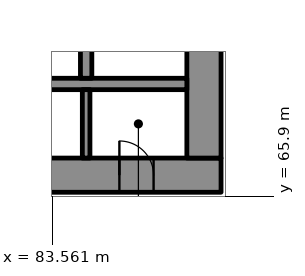
"""IFC4 building model, lengths in metres.
Left out: names, types, materials, properties, quantities, classifications, styles, units other than length and angle.
Written with IfcOpenShell. Run it as: python <this file> out.ifc"""

import sys

from ifc_helpers import new_model, si_unit, direction, frame, frame_2d, origin, place, context, subcontext, project, spatial, rectangle, extrude, element, fill, save


model = new_model("IFC4")
c1 = context("Model", 3, precision=1e-05, world=origin(), true_north=direction((0.0, 1.0)))
c2 = subcontext(c1, "Body", "Model", "MODEL_VIEW")
j1 = project(units=[si_unit("LENGTHUNIT", "METRE"), si_unit("PLANEANGLEUNIT", "RADIAN")], contexts=[c1])
p1 = place(None, origin())
s1 = spatial("IfcSite", under=j1, at=p1, CompositionType="ELEMENT")
p2 = place(p1, origin())
s2 = spatial("IfcBuilding", under=s1, at=p2, CompositionType="ELEMENT")
p3 = place(p2, frame((0.0, 0.0, 26.4)))
s3 = spatial("IfcBuildingStorey", under=s2, at=p3, CompositionType="ELEMENT", Elevation=26.4)
p4 = place(p3, frame((62.0, 66.45, 0.0), z_axis=(0.0, 0.0, 1.0), x_axis=(1.0, 0.0, 0.0)))
e1 = element("IfcWall", 1, at=p4, inside=s3, PredefinedType="SHEAR", context=c2, shape_type="SweptSolid", body=[
    extrude(rectangle(XDim=26.0, YDim=0.9, at=frame_2d((13.0, 0.0))), origin(), (0.0, 0.0, 1.0), 4.15),
])
p5 = place(p4, frame((3.45, 0.0, 0.0)))
e2 = element("IfcOpeningElement", 2, at=p5, cuts=e1, PredefinedType="OPENING", context=c2, shape_type="SweptSolid", body=[
    extrude(rectangle(XDim=0.9, YDim=2.1, at=frame_2d((0.45, 1.05))), frame((0.0, 0.46, 0.0), z_axis=(0.0, -1.0, 0.0), x_axis=(1.0, 0.0, 0.0)), (0.0, 0.0, 1.0), 0.92),
])
p6 = place(p4, frame((6.425, 0.0, 0.0)))
e3 = element("IfcOpeningElement", 3, at=p6, cuts=e1, PredefinedType="OPENING", context=c2, shape_type="SweptSolid", body=[
    extrude(rectangle(XDim=0.9, YDim=2.1, at=frame_2d((0.45, 1.05))), frame((0.0, 0.46, 0.0), z_axis=(0.0, -1.0, 0.0), x_axis=(1.0, 0.0, 0.0)), (0.0, 0.0, 1.0), 0.92),
])
p7 = place(p4, frame((11.5, 0.0, 0.0)))
e4 = element("IfcOpeningElement", 4, at=p7, cuts=e1, PredefinedType="OPENING", context=c2, shape_type="SweptSolid", body=[
    extrude(rectangle(XDim=0.9, YDim=2.1, at=frame_2d((0.45, 1.05))), frame((0.0, 0.46, 0.0), z_axis=(0.0, -1.0, 0.0), x_axis=(1.0, 0.0, 0.0)), (0.0, 0.0, 1.0), 0.92),
])
p8 = place(p4, frame((18.5, 0.0, 0.0)))
e5 = element("IfcOpeningElement", 5, at=p8, cuts=e1, PredefinedType="OPENING", context=c2, shape_type="SweptSolid", body=[
    extrude(rectangle(XDim=0.9, YDim=2.1, at=frame_2d((0.45, 1.05))), frame((0.0, 0.46, 0.0), z_axis=(0.0, -1.0, 0.0), x_axis=(1.0, 0.0, 0.0)), (0.0, 0.0, 1.0), 0.92),
])
p9 = place(p4, frame((23.325, 0.0, 0.0)))
e6 = element("IfcOpeningElement", 6, at=p9, cuts=e1, PredefinedType="OPENING", context=c2, shape_type="SweptSolid", body=[
    extrude(rectangle(XDim=0.9, YDim=2.1, at=frame_2d((0.45, 1.05))), frame((0.0, 0.46, 0.0), z_axis=(0.0, -1.0, 0.0), x_axis=(1.0, 0.0, 0.0)), (0.0, 0.0, 1.0), 0.92),
])
p10 = place(p3, frame((87.55, 66.9, 0.0), z_axis=(0.0, 0.0, 1.0), x_axis=(0.0, 1.0, 0.0)))
e7 = element("IfcWall", 7, at=p10, inside=s3, PredefinedType="SHEAR", context=c2, shape_type="SweptSolid", body=[
    extrude(rectangle(XDim=16.2, YDim=0.9, at=frame_2d((8.1, 0.0))), origin(), (0.0, 0.0, 1.0), 4.15),
])
p11 = place(p10, frame((5.5, 0.0, 0.0)))
e8 = element("IfcOpeningElement", 8, at=p11, cuts=e7, PredefinedType="OPENING", context=c2, shape_type="SweptSolid", body=[
    extrude(rectangle(XDim=1.8, YDim=2.1, at=frame_2d((0.9, 1.05))), frame((0.0, 0.46, 0.0), z_axis=(0.0, -1.0, 0.0), x_axis=(1.0, 0.0, 0.0)), (0.0, 0.0, 1.0), 0.92),
])
p12 = place(p10, frame((12.272, 0.0, 0.0)))
e9 = element("IfcOpeningElement", 9, at=p12, cuts=e7, PredefinedType="OPENING", context=c2, shape_type="SweptSolid", body=[
    extrude(rectangle(XDim=0.9, YDim=2.1, at=frame_2d((0.45, 1.05))), frame((0.0, 0.46, 0.0), z_axis=(0.0, -1.0, 0.0), x_axis=(1.0, 0.0, 0.0)), (0.0, 0.0, 1.0), 0.92),
])
p13 = place(p3, frame((70.35, 68.85, 0.0), z_axis=(0.0, 0.0, 1.0), x_axis=(1.0, 0.0, 0.0)))
e10 = element("IfcWall", 10, at=p13, inside=s3, PredefinedType="SHEAR", context=c2, shape_type="SweptSolid", body=[
    extrude(rectangle(XDim=16.75, YDim=0.3, at=frame_2d((8.375, 0.0))), origin(), (0.0, 0.0, 1.0), 4.15),
])
p14 = place(p3, frame((84.45, 69.0, 0.0), z_axis=(0.0, 0.0, 1.0), x_axis=(0.0, 1.0, 0.0)))
e11 = element("IfcWall", 11, at=p14, inside=s3, PredefinedType="SHEAR", context=c2, shape_type="SweptSolid", body=[
    extrude(rectangle(XDim=2.6, YDim=0.3, at=frame_2d((1.3, 0.0))), origin(), (0.0, 0.0, 1.0), 4.15),
])
p15 = place(p3, frame((84.45, 66.9, 0.0), z_axis=(0.0, 0.0, 1.0), x_axis=(0.0, 1.0, 0.0)))
e12 = element("IfcWall", 12, at=p15, inside=s3, PredefinedType="PARTITIONING", context=c2, shape_type="SweptSolid", body=[
    extrude(rectangle(XDim=1.8, YDim=0.2, at=frame_2d((0.9, 0.0))), origin(), (0.0, 0.0, 1.0), 4.15),
])
p16 = place(p3, frame((107.02, 62.31, 0.0), z_axis=(0.0, 0.0, 1.0), x_axis=(-0.49999992739, 0.866025445706, 0.0)))
e13 = element("IfcWall", 13, at=p16, inside=s3, PredefinedType="PARAPET", context=c2, shape_type="SweptSolid", body=[
    extrude(rectangle(XDim=54.0, YDim=0.2, at=frame_2d((27.0, 0.0))), origin(), (0.0, 0.0, 1.0), 1.1),
])
p17 = place(p9, origin())
e14 = element("IfcDoor", 14, at=p17, inside=s3, OperationType="SINGLE_SWING_LEFT", PredefinedType="DOOR", context=c2, shape_type="SweptSolid", body=[
    extrude(rectangle(XDim=0.9, YDim=2.1, at=frame_2d((0.45, 1.05))), frame((0.0, 0.17, 0.0), z_axis=(0.0, -1.0, 0.0), x_axis=(1.0, 0.0, 0.0)), (0.0, 0.0, 1.0), 0.34),
])
fill(e6, e14)
save(model, sys.argv[1])
